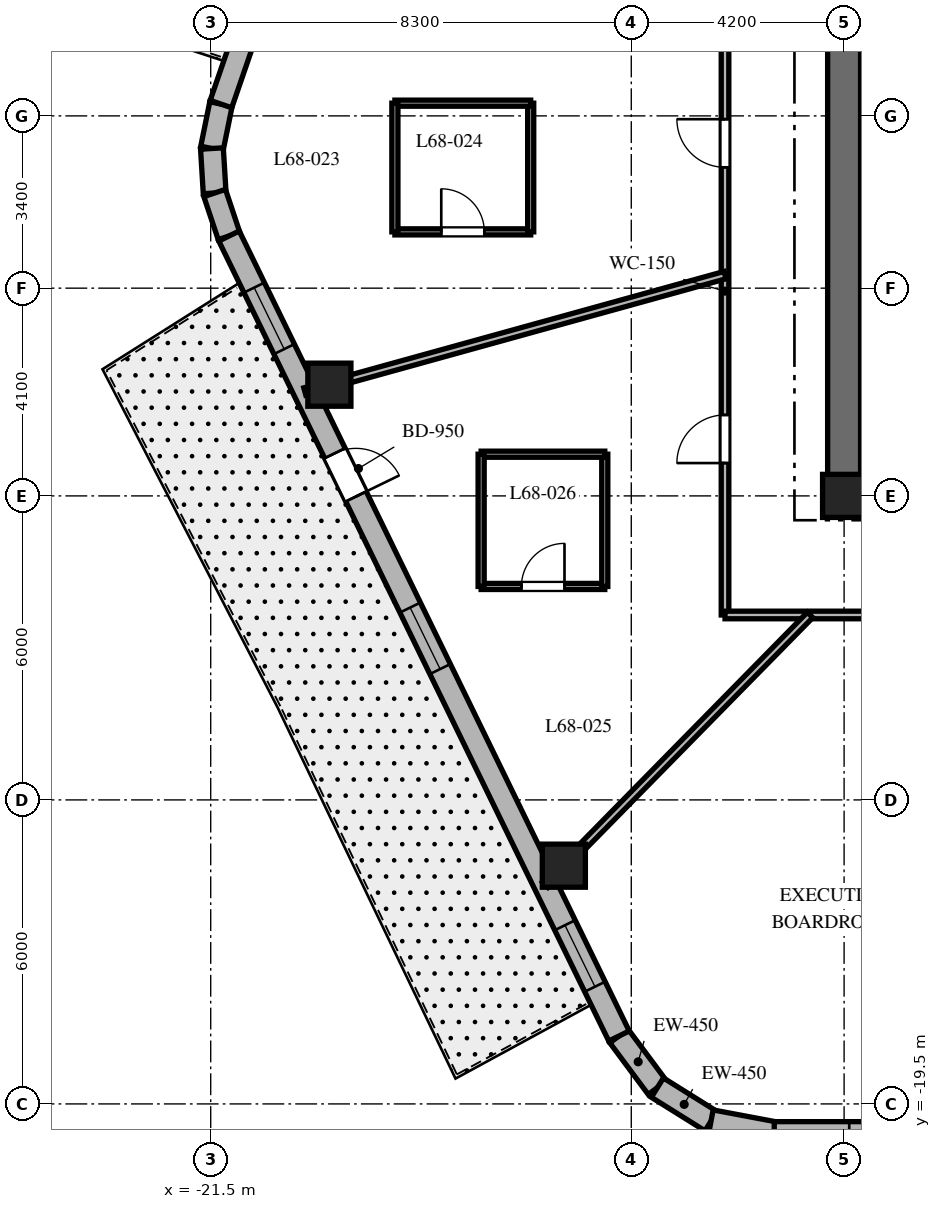
"""IFC4 building model, lengths in metres.
Left out: names, types, materials, properties, quantities, classifications, styles, units other than length and angle.
Written with IfcOpenShell. Run it as: python <this file> out.ifc"""

import sys

from ifc_helpers import new_model, si_unit, direction, frame, frame_2d, origin, origin_2d, place, context, subcontext, project, spatial, rectangle, extrude, element, fill, save


model = new_model("IFC4")
c1 = context("Model", 3, precision=1e-05, world=origin(), true_north=direction((0.0, 1.0)))
c2 = subcontext(c1, "Body", "Model", "MODEL_VIEW")
j1 = project(units=[si_unit("LENGTHUNIT", "METRE"), si_unit("PLANEANGLEUNIT", "RADIAN")], contexts=[c1])
p1 = place(None, origin())
s1 = spatial("IfcSite", under=j1, at=p1, CompositionType="ELEMENT")
p2 = place(p1, origin())
s2 = spatial("IfcBuilding", under=s1, at=p2, CompositionType="ELEMENT")
p3 = place(p2, frame((0.0, 0.0, 273.0)))
s3 = spatial("IfcBuildingStorey", under=s2, at=p3, CompositionType="ELEMENT", Elevation=273.0)
p4 = place(p3, frame((-9.325, -7.5, 0.0), z_axis=(0.0, 0.0, 1.0), x_axis=(1.0, 0.0, 0.0)))
e1 = element("IfcWall", 1, at=p4, inside=s3, PredefinedType="SHEAR", context=c2, shape_type="SweptSolid", body=[
    extrude(rectangle(XDim=18.65, YDim=0.65, at=frame_2d((9.325, 0.0))), origin(), (0.0, 0.0, 1.0), 3.9),
])
p5 = place(p4, frame((9.375, 0.0, 0.0)))
e2 = element("IfcOpeningElement", 2, at=p5, cuts=e1, PredefinedType="OPENING", context=c2, shape_type="SweptSolid", body=[
    extrude(rectangle(XDim=1.0, YDim=2.15, at=frame_2d((0.5, 1.075))), frame((0.0, 0.335, 0.0), z_axis=(0.0, -1.0, 0.0), x_axis=(1.0, 0.0, 0.0)), (0.0, 0.0, 1.0), 0.67),
])
p6 = place(p3, frame((-9.0, -7.175, 0.0), z_axis=(0.0, 0.0, 1.0), x_axis=(0.0, 1.0, 0.0)))
e3 = element("IfcWall", 3, at=p6, inside=s3, PredefinedType="SHEAR", context=c2, shape_type="SweptSolid", body=[
    extrude(rectangle(XDim=14.35, YDim=0.65, at=frame_2d((7.175, 0.0))), origin(), (0.0, 0.0, 1.0), 3.9),
])
p7 = place(p6, frame((10.3, 0.0, 0.0)))
e4 = element("IfcOpeningElement", 4, at=p7, cuts=e3, PredefinedType="OPENING", context=c2, shape_type="SweptSolid", body=[
    extrude(rectangle(XDim=1.05, YDim=2.15, at=frame_2d((0.525, 1.075))), frame((0.0, 0.335, 0.0), z_axis=(0.0, -1.0, 0.0), x_axis=(1.0, 0.0, 0.0)), (0.0, 0.0, 1.0), 0.67),
])
for number, where, z_axis, x_axis in (
    (5, (-9.0, -7.5, 0.0), (0.0, 0.0, 1.0), (1.0, 0.0, 0.0)),
    (6, (-19.158, -5.305, 0.0), (0.0, 0.0, 1.0), (1.0, 0.0, 0.0)),
    (7, (-14.531, -14.798, 0.0), (0.0, 0.0, 1.0), (1.0, 0.0, 0.0)),
):
    element("IfcColumn", number, at=place(p3, frame(where, z_axis=z_axis, x_axis=x_axis)), inside=s3, PredefinedType="COLUMN", context=c2, shape_type="SweptSolid", body=[
        extrude(rectangle(XDim=0.85, YDim=0.85, at=origin_2d()), origin(), (0.0, 0.0, 1.0), 3.9),
    ])
p8 = place(p3, frame((-13.443, -18.16, 0.0), z_axis=(0.0, 0.0, 1.0), x_axis=(0.597042425808, -0.802209661987, 0.0)))
e8 = element("IfcWall", 8, at=p8, inside=s3, PredefinedType="SOLIDWALL", context=c2, shape_type="SweptSolid", body=[
    extrude(rectangle(XDim=1.27, YDim=0.45, at=frame_2d((0.635, 0.0))), origin(), (0.0, 0.0, 1.0), 3.6),
])
p9 = place(p3, frame((-12.685, -19.178, 0.0), z_axis=(0.0, 0.0, 1.0), x_axis=(0.848031272749, -0.529946186362, 0.0)))
e9 = element("IfcWall", 9, at=p9, inside=s3, PredefinedType="SOLIDWALL", context=c2, shape_type="SweptSolid", body=[
    extrude(rectangle(XDim=1.248, YDim=0.45, at=frame_2d((0.624, 0.0))), origin(), (0.0, 0.0, 1.0), 3.6),
])
p10 = place(p3, frame((-11.626, -19.84, 0.0), z_axis=(0.0, 0.0, 1.0), x_axis=(0.982701956681, -0.185194126083, 0.0)))
e10 = element("IfcWall", 10, at=p10, inside=s3, PredefinedType="SOLIDWALL", context=c2, shape_type="SweptSolid", body=[
    extrude(rectangle(XDim=1.27, YDim=0.45, at=frame_2d((0.635, 0.0))), origin(), (0.0, 0.0, 1.0), 3.6),
])
p11 = place(p3, frame((-21.298, 0.233, 0.0), z_axis=(0.0, 0.0, 1.0), x_axis=(-0.199158176661, -0.979967356941, 0.0)))
e11 = element("IfcWall", 11, at=p11, inside=s3, PredefinedType="SOLIDWALL", context=c2, shape_type="SweptSolid", body=[
    extrude(rectangle(XDim=0.895, YDim=0.45, at=frame_2d((0.447, 0.0))), origin(), (0.0, 0.0, 1.0), 3.6),
])
p12 = place(p3, frame((-21.476, -0.644, 0.0), z_axis=(0.0, 0.0, 1.0), x_axis=(0.061031097918, -0.998135865044, 0.0)))
e12 = element("IfcWall", 12, at=p12, inside=s3, PredefinedType="SOLIDWALL", context=c2, shape_type="SweptSolid", body=[
    extrude(rectangle(XDim=0.88, YDim=0.45, at=frame_2d((0.44, 0.0))), origin(), (0.0, 0.0, 1.0), 3.6),
])
p13 = place(p3, frame((-21.422, -1.522, 0.0), z_axis=(0.0, 0.0, 1.0), x_axis=(0.316964162323, -0.94843751497, 0.0)))
e13 = element("IfcWall", 13, at=p13, inside=s3, PredefinedType="SOLIDWALL", context=c2, shape_type="SweptSolid", body=[
    extrude(rectangle(XDim=0.895, YDim=0.45, at=frame_2d((0.448, 0.0))), origin(), (0.0, 0.0, 1.0), 3.6),
])
p14 = place(p3, frame((-10.379, -20.075, 0.0), z_axis=(0.0, 0.0, 1.0), x_axis=(1.0, 0.0, 0.0)))
e14 = element("IfcWall", 14, at=p14, inside=s3, PredefinedType="SOLIDWALL", context=c2, shape_type="SweptSolid", body=[
    extrude(rectangle(XDim=22.417, YDim=0.45, at=frame_2d((11.208, 0.0))), origin(), (0.0, 0.0, 1.0), 3.6),
])
p15 = place(p14, frame((1.48, 0.0, 0.8)))
e15 = element("IfcOpeningElement", 15, at=p15, cuts=e14, PredefinedType="OPENING", context=c2, shape_type="SweptSolid", body=[
    extrude(rectangle(XDim=1.35, YDim=1.75, at=frame_2d((0.675, 0.875))), frame((0.0, 0.235, 0.0), z_axis=(0.0, -1.0, 0.0), x_axis=(1.0, 0.0, 0.0)), (0.0, 0.0, 1.0), 0.47),
])
p16 = place(p14, frame((10.534, 0.0, 0.8)))
e16 = element("IfcOpeningElement", 16, at=p16, cuts=e14, PredefinedType="OPENING", context=c2, shape_type="SweptSolid", body=[
    extrude(rectangle(XDim=1.35, YDim=1.75, at=frame_2d((0.675, 0.875))), frame((0.0, 0.235, 0.0), z_axis=(0.0, -1.0, 0.0), x_axis=(1.0, 0.0, 0.0)), (0.0, 0.0, 1.0), 0.47),
])
p17 = place(p14, frame((19.587, 0.0, 0.8)))
e17 = element("IfcOpeningElement", 17, at=p17, cuts=e14, PredefinedType="OPENING", context=c2, shape_type="SweptSolid", body=[
    extrude(rectangle(XDim=1.35, YDim=1.75, at=frame_2d((0.675, 0.875))), frame((0.0, 0.235, 0.0), z_axis=(0.0, -1.0, 0.0), x_axis=(1.0, 0.0, 0.0)), (0.0, 0.0, 1.0), 0.47),
])
p18 = place(p3, frame((-15.26, 17.776, 0.0), z_axis=(0.0, 0.0, 1.0), x_axis=(-0.325407437101, -0.945573899745, 0.0)))
e18 = element("IfcWall", 18, at=p18, inside=s3, PredefinedType="SOLIDWALL", context=c2, shape_type="SweptSolid", body=[
    extrude(rectangle(XDim=18.552, YDim=0.45, at=frame_2d((9.276, 0.0))), origin(), (0.0, 0.0, 1.0), 3.6),
])
p19 = place(p18, frame((4.602, 0.0, 0.0)))
e19 = element("IfcOpeningElement", 19, at=p19, cuts=e18, PredefinedType="OPENING", context=c2, shape_type="SweptSolid", body=[
    extrude(rectangle(XDim=1.0, YDim=2.15, at=frame_2d((0.5, 1.075))), frame((0.0, 0.235, 0.0), z_axis=(0.0, -1.0, 0.0), x_axis=(1.0, 0.0, 0.0)), (0.0, 0.0, 1.0), 0.47),
])
p20 = place(p18, frame((1.161, 0.0, 0.8)))
e20 = element("IfcOpeningElement", 20, at=p20, cuts=e18, PredefinedType="OPENING", context=c2, shape_type="SweptSolid", body=[
    extrude(rectangle(XDim=1.35, YDim=1.75, at=frame_2d((0.675, 0.875))), frame((0.0, 0.235, 0.0), z_axis=(0.0, -1.0, 0.0), x_axis=(1.0, 0.0, 0.0)), (0.0, 0.0, 1.0), 0.47),
])
p21 = place(p18, frame((6.412, 0.0, 0.8)))
e21 = element("IfcOpeningElement", 21, at=p21, cuts=e18, PredefinedType="OPENING", context=c2, shape_type="SweptSolid", body=[
    extrude(rectangle(XDim=1.35, YDim=1.75, at=frame_2d((0.675, 0.875))), frame((0.0, 0.235, 0.0), z_axis=(0.0, -1.0, 0.0), x_axis=(1.0, 0.0, 0.0)), (0.0, 0.0, 1.0), 0.47),
])
p22 = place(p18, frame((10.892, 0.0, 0.8)))
e22 = element("IfcOpeningElement", 22, at=p22, cuts=e18, PredefinedType="OPENING", context=c2, shape_type="SweptSolid", body=[
    extrude(rectangle(XDim=1.35, YDim=1.75, at=frame_2d((0.675, 0.875))), frame((0.0, 0.235, 0.0), z_axis=(0.0, -1.0, 0.0), x_axis=(1.0, 0.0, 0.0)), (0.0, 0.0, 1.0), 0.47),
])
p23 = place(p18, frame((15.987, 0.0, 0.8)))
e23 = element("IfcOpeningElement", 23, at=p23, cuts=e18, PredefinedType="OPENING", context=c2, shape_type="SweptSolid", body=[
    extrude(rectangle(XDim=1.35, YDim=1.75, at=frame_2d((0.675, 0.875))), frame((0.0, 0.235, 0.0), z_axis=(0.0, -1.0, 0.0), x_axis=(1.0, 0.0, 0.0)), (0.0, 0.0, 1.0), 0.47),
])
p24 = place(p3, frame((-21.138, -2.371, 0.0), z_axis=(0.0, 0.0, 1.0), x_axis=(0.438128124058, -0.89891253574, 0.0)))
e24 = element("IfcWall", 24, at=p24, inside=s3, PredefinedType="SOLIDWALL", context=c2, shape_type="SweptSolid", body=[
    extrude(rectangle(XDim=17.565, YDim=0.45, at=frame_2d((8.782, 0.0))), origin(), (0.0, 0.0, 1.0), 3.6),
])
p25 = place(p24, frame((4.769, 0.0, 0.0)))
e25 = element("IfcOpeningElement", 25, at=p25, cuts=e24, PredefinedType="OPENING", context=c2, shape_type="SweptSolid", body=[
    extrude(rectangle(XDim=0.95, YDim=2.15, at=frame_2d((0.475, 1.075))), frame((0.0, 0.235, 0.0), z_axis=(0.0, -1.0, 0.0), x_axis=(1.0, 0.0, 0.0)), (0.0, 0.0, 1.0), 0.47),
])
p26 = place(p24, frame((1.133, 0.0, 0.8)))
e26 = element("IfcOpeningElement", 26, at=p26, cuts=e24, PredefinedType="OPENING", context=c2, shape_type="SweptSolid", body=[
    extrude(rectangle(XDim=1.35, YDim=1.75, at=frame_2d((0.675, 0.875))), frame((0.0, 0.235, 0.0), z_axis=(0.0, -1.0, 0.0), x_axis=(1.0, 0.0, 0.0)), (0.0, 0.0, 1.0), 0.47),
])
p27 = place(p24, frame((8.158, 0.0, 0.8)))
e27 = element("IfcOpeningElement", 27, at=p27, cuts=e24, PredefinedType="OPENING", context=c2, shape_type="SweptSolid", body=[
    extrude(rectangle(XDim=1.35, YDim=1.75, at=frame_2d((0.675, 0.875))), frame((0.0, 0.235, 0.0), z_axis=(0.0, -1.0, 0.0), x_axis=(1.0, 0.0, 0.0)), (0.0, 0.0, 1.0), 0.47),
])
p28 = place(p24, frame((15.132, 0.0, 0.8)))
e28 = element("IfcOpeningElement", 28, at=p28, cuts=e24, PredefinedType="OPENING", context=c2, shape_type="SweptSolid", body=[
    extrude(rectangle(XDim=1.35, YDim=1.75, at=frame_2d((0.675, 0.875))), frame((0.0, 0.235, 0.0), z_axis=(0.0, -1.0, 0.0), x_axis=(1.0, 0.0, 0.0)), (0.0, 0.0, 1.0), 0.47),
])
p29 = place(p3, frame((-11.35, -9.85, 0.0), z_axis=(0.0, 0.0, 1.0), x_axis=(0.0, 1.0, 0.0)))
e29 = element("IfcWall", 29, at=p29, inside=s3, PredefinedType="PARTITIONING", context=c2, shape_type="SweptSolid", body=[
    extrude(rectangle(XDim=12.4, YDim=0.15, at=frame_2d((6.2, 0.0))), origin(), (0.0, 0.0, 1.0), 3.09),
])
p30 = place(p29, frame((8.835, 0.0, 0.0)))
e30 = element("IfcOpeningElement", 30, at=p30, cuts=e29, PredefinedType="OPENING", context=c2, shape_type="SweptSolid", body=[
    extrude(rectangle(XDim=0.95, YDim=2.03, at=frame_2d((0.475, 1.015))), frame((0.0, 0.085, 0.0), z_axis=(0.0, -1.0, 0.0), x_axis=(1.0, 0.0, 0.0)), (0.0, 0.0, 1.0), 0.17),
])
p31 = place(p29, frame((2.998, 0.0, 0.0)))
e31 = element("IfcOpeningElement", 31, at=p31, cuts=e29, PredefinedType="OPENING", context=c2, shape_type="SweptSolid", body=[
    extrude(rectangle(XDim=0.95, YDim=2.03, at=frame_2d((0.475, 1.015))), frame((0.0, 0.085, 0.0), z_axis=(0.0, -1.0, 0.0), x_axis=(1.0, 0.0, 0.0)), (0.0, 0.0, 1.0), 0.17),
])
p32 = place(p3, frame((-0.92, -9.85, 0.0), z_axis=(0.0, 0.0, 1.0), x_axis=(-1.0, 0.0, 0.0)))
e32 = element("IfcWall", 32, at=p32, inside=s3, PredefinedType="PARTITIONING", context=c2, shape_type="SweptSolid", body=[
    extrude(rectangle(XDim=10.43, YDim=0.15, at=frame_2d((5.215, 0.0))), origin(), (0.0, 0.0, 1.0), 3.09),
])
p33 = place(p32, frame((4.975, 0.0, 0.0)))
e33 = element("IfcOpeningElement", 33, at=p33, cuts=e32, PredefinedType="OPENING", context=c2, shape_type="SweptSolid", body=[
    extrude(rectangle(XDim=0.95, YDim=2.03, at=frame_2d((0.475, 1.015))), frame((0.0, 0.085, 0.0), z_axis=(0.0, -1.0, 0.0), x_axis=(1.0, 0.0, 0.0)), (0.0, 0.0, 1.0), 0.17),
])
p34 = place(p3, frame((-11.35, -3.143, 0.0), z_axis=(0.0, 0.0, 1.0), x_axis=(-0.963731818141, -0.266872596386, 0.0)))
e34 = element("IfcWall", 34, at=p34, inside=s3, PredefinedType="PARTITIONING", context=c2, shape_type="SweptSolid", body=[
    extrude(rectangle(XDim=8.605, YDim=0.15, at=frame_2d((4.302, 0.0))), origin(), (0.0, 0.0, 1.0), 2.94),
])
p35 = place(p3, frame((-9.672, -9.85, 0.0), z_axis=(0.0, 0.0, 1.0), x_axis=(-0.700629771301, -0.713524998558, 0.0)))
e35 = element("IfcWall", 35, at=p35, inside=s3, PredefinedType="PARTITIONING", context=c2, shape_type="SweptSolid", body=[
    extrude(rectangle(XDim=7.459, YDim=0.15, at=frame_2d((3.73, 0.0))), origin(), (0.0, 0.0, 1.0), 2.94),
])
p36 = place(p3, frame((-17.865, -2.289, 0.0), z_axis=(0.0, 0.0, 1.0), x_axis=(1.0, 0.0, 0.0)))
e36 = element("IfcWall", 36, at=p36, inside=s3, PredefinedType="PARTITIONING", context=c2, shape_type="SweptSolid", body=[
    extrude(rectangle(XDim=2.68, YDim=0.12, at=frame_2d((1.34, 0.0))), origin(), (0.0, 0.0, 1.0), 3.041),
])
p37 = place(p36, frame((0.915, 0.0, 0.0)))
e37 = element("IfcOpeningElement", 37, at=p37, cuts=e36, PredefinedType="OPENING", context=c2, shape_type="SweptSolid", body=[
    extrude(rectangle(XDim=0.85, YDim=2.03, at=frame_2d((0.425, 1.015))), frame((0.0, 0.07, 0.0), z_axis=(0.0, -1.0, 0.0), x_axis=(1.0, 0.0, 0.0)), (0.0, 0.0, 1.0), 0.14),
])
p38 = place(p3, frame((-15.185, -2.289, 0.0), z_axis=(0.0, 0.0, 1.0), x_axis=(0.0, 1.0, 0.0)))
e38 = element("IfcWall", 38, at=p38, inside=s3, PredefinedType="PARTITIONING", context=c2, shape_type="SweptSolid", body=[
    extrude(rectangle(XDim=2.54, YDim=0.12, at=frame_2d((1.27, 0.0))), origin(), (0.0, 0.0, 1.0), 3.6),
])
p39 = place(p3, frame((-15.185, 0.251, 0.0), z_axis=(0.0, 0.0, 1.0), x_axis=(-1.0, 0.0, 0.0)))
e39 = element("IfcWall", 39, at=p39, inside=s3, PredefinedType="PARTITIONING", context=c2, shape_type="SweptSolid", body=[
    extrude(rectangle(XDim=2.68, YDim=0.12, at=frame_2d((1.34, 0.0))), origin(), (0.0, 0.0, 1.0), 3.041),
])
p40 = place(p3, frame((-17.865, 0.251, 0.0), z_axis=(0.0, 0.0, 1.0), x_axis=(0.0, -1.0, 0.0)))
e40 = element("IfcWall", 40, at=p40, inside=s3, PredefinedType="PARTITIONING", context=c2, shape_type="SweptSolid", body=[
    extrude(rectangle(XDim=2.54, YDim=0.12, at=frame_2d((1.27, 0.0))), origin(), (0.0, 0.0, 1.0), 3.6),
])
p41 = place(p3, frame((-16.163, -9.287, 0.0), z_axis=(0.0, 0.0, 1.0), x_axis=(1.0, 0.0, 0.0)))
e41 = element("IfcWall", 41, at=p41, inside=s3, PredefinedType="PARTITIONING", context=c2, shape_type="SweptSolid", body=[
    extrude(rectangle(XDim=2.44, YDim=0.12, at=frame_2d((1.22, 0.0))), origin(), (0.0, 0.0, 1.0), 3.126),
])
p42 = place(p41, frame((0.795, 0.0, 0.0)))
e42 = element("IfcOpeningElement", 42, at=p42, cuts=e41, PredefinedType="OPENING", context=c2, shape_type="SweptSolid", body=[
    extrude(rectangle(XDim=0.85, YDim=2.03, at=frame_2d((0.425, 1.015))), frame((0.0, 0.07, 0.0), z_axis=(0.0, -1.0, 0.0), x_axis=(1.0, 0.0, 0.0)), (0.0, 0.0, 1.0), 0.14),
])
p43 = place(p3, frame((-13.723, -9.287, 0.0), z_axis=(0.0, 0.0, 1.0), x_axis=(0.0, 1.0, 0.0)))
e43 = element("IfcWall", 43, at=p43, inside=s3, PredefinedType="PARTITIONING", context=c2, shape_type="SweptSolid", body=[
    extrude(rectangle(XDim=2.61, YDim=0.12, at=frame_2d((1.305, 0.0))), origin(), (0.0, 0.0, 1.0), 3.6),
])
p44 = place(p3, frame((-13.723, -6.677, 0.0), z_axis=(0.0, 0.0, 1.0), x_axis=(-1.0, 0.0, 0.0)))
e44 = element("IfcWall", 44, at=p44, inside=s3, PredefinedType="PARTITIONING", context=c2, shape_type="SweptSolid", body=[
    extrude(rectangle(XDim=2.44, YDim=0.12, at=frame_2d((1.22, 0.0))), origin(), (0.0, 0.0, 1.0), 3.126),
])
p45 = place(p3, frame((-16.163, -6.677, 0.0), z_axis=(0.0, 0.0, 1.0), x_axis=(0.0, -1.0, 0.0)))
e45 = element("IfcWall", 45, at=p45, inside=s3, PredefinedType="PARTITIONING", context=c2, shape_type="SweptSolid", body=[
    extrude(rectangle(XDim=2.61, YDim=0.12, at=frame_2d((1.305, 0.0))), origin(), (0.0, 0.0, 1.0), 3.6),
])
p46 = place(p25, origin())
e46 = element("IfcDoor", 46, at=p46, inside=s3, OperationType="SINGLE_SWING_RIGHT", PredefinedType="DOOR", context=c2, shape_type="SweptSolid", body=[
    extrude(rectangle(XDim=0.95, YDim=2.15, at=frame_2d((0.475, 1.075))), frame((0.0, 0.025, 0.0), z_axis=(0.0, -1.0, 0.0), x_axis=(1.0, 0.0, 0.0)), (0.0, 0.0, 1.0), 0.05),
])
fill(e25, e46)
p47 = place(p26, origin())
e47 = element("IfcWindow", 47, at=p47, inside=s3, PartitioningType="SINGLE_PANEL", PredefinedType="WINDOW", context=c2, shape_type="SweptSolid", body=[
    extrude(rectangle(XDim=1.35, YDim=1.75, at=frame_2d((0.675, 0.875))), frame((0.0, 0.03, 0.0), z_axis=(0.0, -1.0, 0.0), x_axis=(1.0, 0.0, 0.0)), (0.0, 0.0, 1.0), 0.06),
])
fill(e26, e47)
p48 = place(p27, origin())
e48 = element("IfcWindow", 48, at=p48, inside=s3, PartitioningType="SINGLE_PANEL", PredefinedType="WINDOW", context=c2, shape_type="SweptSolid", body=[
    extrude(rectangle(XDim=1.35, YDim=1.75, at=frame_2d((0.675, 0.875))), frame((0.0, 0.03, 0.0), z_axis=(0.0, -1.0, 0.0), x_axis=(1.0, 0.0, 0.0)), (0.0, 0.0, 1.0), 0.06),
])
fill(e27, e48)
p49 = place(p28, origin())
e49 = element("IfcWindow", 49, at=p49, inside=s3, PartitioningType="SINGLE_PANEL", PredefinedType="WINDOW", context=c2, shape_type="SweptSolid", body=[
    extrude(rectangle(XDim=1.35, YDim=1.75, at=frame_2d((0.675, 0.875))), frame((0.0, 0.03, 0.0), z_axis=(0.0, -1.0, 0.0), x_axis=(1.0, 0.0, 0.0)), (0.0, 0.0, 1.0), 0.06),
])
fill(e28, e49)
p50 = place(p30, origin())
e50 = element("IfcDoor", 50, at=p50, inside=s3, OperationType="SINGLE_SWING_RIGHT", PredefinedType="DOOR", context=c2, shape_type="SweptSolid", body=[
    extrude(rectangle(XDim=0.95, YDim=2.03, at=frame_2d((0.475, 1.015))), frame((0.0, 0.025, 0.0), z_axis=(0.0, -1.0, 0.0), x_axis=(1.0, 0.0, 0.0)), (0.0, 0.0, 1.0), 0.05),
])
fill(e30, e50)
p51 = place(p37, origin())
e51 = element("IfcDoor", 51, at=p51, inside=s3, OperationType="SINGLE_SWING_LEFT", PredefinedType="DOOR", context=c2, shape_type="SweptSolid", body=[
    extrude(rectangle(XDim=0.85, YDim=2.03, at=frame_2d((0.425, 1.015))), frame((0.0, 0.025, 0.0), z_axis=(0.0, -1.0, 0.0), x_axis=(1.0, 0.0, 0.0)), (0.0, 0.0, 1.0), 0.05),
])
fill(e37, e51)
p52 = place(p31, origin())
e52 = element("IfcDoor", 52, at=p52, inside=s3, OperationType="SINGLE_SWING_LEFT", PredefinedType="DOOR", context=c2, shape_type="SweptSolid", body=[
    extrude(rectangle(XDim=0.95, YDim=2.03, at=frame_2d((0.475, 1.015))), frame((0.0, 0.025, 0.0), z_axis=(0.0, -1.0, 0.0), x_axis=(1.0, 0.0, 0.0)), (0.0, 0.0, 1.0), 0.05),
])
fill(e31, e52)
p53 = place(p42, origin())
e53 = element("IfcDoor", 53, at=p53, inside=s3, OperationType="SINGLE_SWING_RIGHT", PredefinedType="DOOR", context=c2, shape_type="SweptSolid", body=[
    extrude(rectangle(XDim=0.85, YDim=2.03, at=frame_2d((0.425, 1.015))), frame((0.0, 0.025, 0.0), z_axis=(0.0, -1.0, 0.0), x_axis=(1.0, 0.0, 0.0)), (0.0, 0.0, 1.0), 0.05),
])
fill(e42, e53)
save(model, sys.argv[1])
